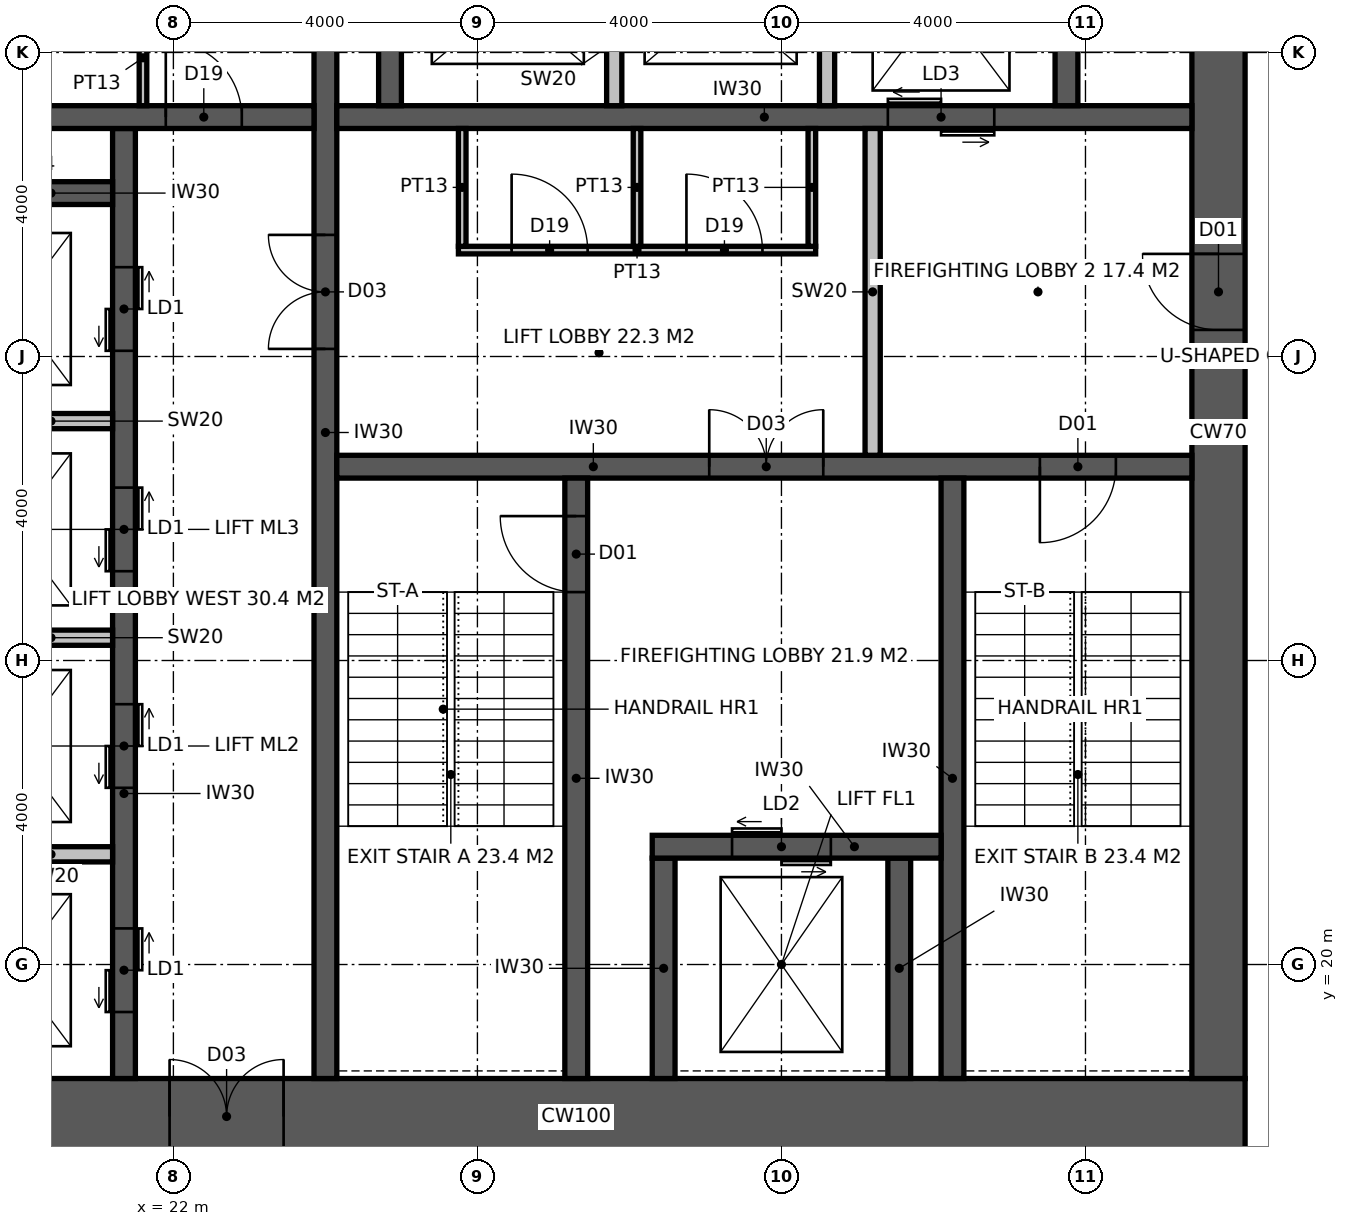
"""IFC4 building model, lengths in metres.
Left out: names, types, materials, properties, quantities, classifications, styles, units other than length and angle.
Written with IfcOpenShell. Run it as: python <this file> out.ifc"""

import sys

from ifc_helpers import new_model, si_unit, direction, frame, frame_2d, origin, place, context, subcontext, project, spatial, rectangle, extrude, element, fill, save


model = new_model("IFC4")
c1 = context("Model", 3, precision=1e-05, world=origin(), true_north=direction((0.0, 1.0)))
c2 = subcontext(c1, "Body", "Model", "MODEL_VIEW")
j1 = project(units=[si_unit("LENGTHUNIT", "METRE"), si_unit("PLANEANGLEUNIT", "RADIAN")], contexts=[c1])
p1 = place(None, origin())
s1 = spatial("IfcSite", under=j1, at=p1, CompositionType="ELEMENT")
p2 = place(p1, origin())
s2 = spatial("IfcBuilding", under=s1, at=p2, CompositionType="ELEMENT")
p3 = place(p2, frame((0.0, 0.0, 109.4)))
s3 = spatial("IfcBuildingStorey", under=s2, at=p3, CompositionType="ELEMENT", Elevation=109.4)
p4 = place(p3, frame((18.5, 18.0, -0.15), z_axis=(0.0, 0.0, 1.0), x_axis=(1.0, 0.0, 0.0)))
e1 = element("IfcWall", 1, at=p4, inside=s3, PredefinedType="SHEAR", context=c2, shape_type="SweptSolid", body=[
    extrude(rectangle(XDim=17.6, YDim=1.0, at=frame_2d((8.8, 0.0))), origin(), (0.0, 0.0, 1.0), 4.0),
])
p5 = place(p4, frame((3.45, 0.0, 0.15)))
e2 = element("IfcOpeningElement", 2, at=p5, cuts=e1, PredefinedType="OPENING", context=c2, shape_type="SweptSolid", body=[
    extrude(rectangle(XDim=1.5, YDim=2.4, at=frame_2d((0.75, 1.2))), frame((0.0, 0.51, 0.0), z_axis=(0.0, -1.0, 0.0), x_axis=(1.0, 0.0, 0.0)), (0.0, 0.0, 1.0), 1.02),
])
p6 = place(p3, frame((35.75, 18.5, -0.15), z_axis=(0.0, 0.0, 1.0), x_axis=(0.0, 1.0, 0.0)))
e3 = element("IfcWall", 3, at=p6, inside=s3, PredefinedType="SHEAR", context=c2, shape_type="SweptSolid", body=[
    extrude(rectangle(XDim=17.0, YDim=0.7, at=frame_2d((8.5, 0.0))), origin(), (0.0, 0.0, 1.0), 4.0),
])
p7 = place(p6, frame((9.85, 0.0, 0.15)))
e4 = element("IfcOpeningElement", 4, at=p7, cuts=e3, PredefinedType="OPENING", context=c2, shape_type="SweptSolid", body=[
    extrude(rectangle(XDim=1.0, YDim=2.2, at=frame_2d((0.5, 1.1))), frame((0.0, 0.36, 0.0), z_axis=(0.0, -1.0, 0.0), x_axis=(1.0, 0.0, 0.0)), (0.0, 0.0, 1.0), 0.72),
])
p8 = place(p3, frame((24.0, 18.5, -0.15), z_axis=(0.0, 0.0, 1.0), x_axis=(0.0, 1.0, 0.0)))
e5 = element("IfcWall", 5, at=p8, inside=s3, PredefinedType="SHEAR", context=c2, shape_type="SweptSolid", body=[
    extrude(rectangle(XDim=17.0, YDim=0.3, at=frame_2d((8.5, 0.0))), origin(), (0.0, 0.0, 1.0), 4.0),
])
p9 = place(p8, frame((9.6, 0.0, 0.15)))
e6 = element("IfcOpeningElement", 6, at=p9, cuts=e5, PredefinedType="OPENING", context=c2, shape_type="SweptSolid", body=[
    extrude(rectangle(XDim=1.5, YDim=2.4, at=frame_2d((0.75, 1.2))), frame((0.0, 0.16, 0.0), z_axis=(0.0, -1.0, 0.0), x_axis=(1.0, 0.0, 0.0)), (0.0, 0.0, 1.0), 0.32),
])
p10 = place(p3, frame((24.15, 26.55, -0.15), z_axis=(0.0, 0.0, 1.0), x_axis=(1.0, 0.0, 0.0)))
e7 = element("IfcWall", 7, at=p10, inside=s3, PredefinedType="SHEAR", context=c2, shape_type="SweptSolid", body=[
    extrude(rectangle(XDim=11.25, YDim=0.3, at=frame_2d((5.625, 0.0))), origin(), (0.0, 0.0, 1.0), 4.0),
])
p11 = place(p10, frame((9.25, 0.0, 0.15)))
e8 = element("IfcOpeningElement", 8, at=p11, cuts=e7, PredefinedType="OPENING", context=c2, shape_type="SweptSolid", body=[
    extrude(rectangle(XDim=1.0, YDim=2.2, at=frame_2d((0.5, 1.1))), frame((0.0, 0.16, 0.0), z_axis=(0.0, -1.0, 0.0), x_axis=(1.0, 0.0, 0.0)), (0.0, 0.0, 1.0), 0.32),
])
p12 = place(p10, frame((4.9, 0.0, 0.15)))
e9 = element("IfcOpeningElement", 9, at=p12, cuts=e7, PredefinedType="OPENING", context=c2, shape_type="SweptSolid", body=[
    extrude(rectangle(XDim=1.5, YDim=2.4, at=frame_2d((0.75, 1.2))), frame((0.0, 0.16, 0.0), z_axis=(0.0, -1.0, 0.0), x_axis=(1.0, 0.0, 0.0)), (0.0, 0.0, 1.0), 0.32),
])
p13 = place(p3, frame((27.3, 18.5, -0.15), z_axis=(0.0, 0.0, 1.0), x_axis=(0.0, 1.0, 0.0)))
e10 = element("IfcWall", 10, at=p13, inside=s3, PredefinedType="SHEAR", context=c2, shape_type="SweptSolid", body=[
    extrude(rectangle(XDim=7.9, YDim=0.3, at=frame_2d((3.95, 0.0))), origin(), (0.0, 0.0, 1.0), 4.0),
])
p14 = place(p13, frame((6.4, 0.0, 0.15)))
e11 = element("IfcOpeningElement", 11, at=p14, cuts=e10, PredefinedType="OPENING", context=c2, shape_type="SweptSolid", body=[
    extrude(rectangle(XDim=1.0, YDim=2.2, at=frame_2d((0.5, 1.1))), frame((0.0, 0.16, 0.0), z_axis=(0.0, -1.0, 0.0), x_axis=(1.0, 0.0, 0.0)), (0.0, 0.0, 1.0), 0.32),
])
p15 = place(p3, frame((32.25, 18.5, -0.15), z_axis=(0.0, 0.0, 1.0), x_axis=(0.0, 1.0, 0.0)))
e12 = element("IfcWall", 12, at=p15, inside=s3, PredefinedType="SHEAR", context=c2, shape_type="SweptSolid", body=[
    extrude(rectangle(XDim=7.9, YDim=0.3, at=frame_2d((3.95, 0.0))), origin(), (0.0, 0.0, 1.0), 4.0),
])
for number, where, z_axis, x_axis in (
    (13, (28.45, 18.5, -0.15), (0.0, 0.0, 1.0), (0.0, 1.0, 0.0)),
    (14, (31.55, 18.5, -0.15), (0.0, 0.0, 1.0), (0.0, 1.0, 0.0)),
):
    element("IfcWall", number, at=place(p3, frame(where, z_axis=z_axis, x_axis=x_axis)), inside=s3, PredefinedType="SHEAR", context=c2, shape_type="SweptSolid", body=[
        extrude(rectangle(XDim=2.9, YDim=0.3, at=frame_2d((1.45, 0.0))), origin(), (0.0, 0.0, 1.0), 4.0),
    ])
p16 = place(p3, frame((28.3, 21.55, -0.15), z_axis=(0.0, 0.0, 1.0), x_axis=(1.0, 0.0, 0.0)))
e15 = element("IfcWall", 15, at=p16, inside=s3, PredefinedType="SHEAR", context=c2, shape_type="SweptSolid", body=[
    extrude(rectangle(XDim=3.8, YDim=0.3, at=frame_2d((1.9, 0.0))), origin(), (0.0, 0.0, 1.0), 4.0),
])
p17 = place(p16, frame((1.05, 0.0, 0.15)))
e16 = element("IfcOpeningElement", 16, at=p17, cuts=e15, PredefinedType="OPENING", context=c2, shape_type="SweptSolid", body=[
    extrude(rectangle(XDim=1.3, YDim=2.4, at=frame_2d((0.65, 1.2))), frame((0.0, 0.16, 0.0), z_axis=(0.0, -1.0, 0.0), x_axis=(1.0, 0.0, 0.0)), (0.0, 0.0, 1.0), 0.32),
])
p18 = place(p3, frame((24.15, 31.15, -0.15), z_axis=(0.0, 0.0, 1.0), x_axis=(1.0, 0.0, 0.0)))
e17 = element("IfcWall", 17, at=p18, inside=s3, PredefinedType="SHEAR", context=c2, shape_type="SweptSolid", body=[
    extrude(rectangle(XDim=11.25, YDim=0.3, at=frame_2d((5.625, 0.0))), origin(), (0.0, 0.0, 1.0), 4.0),
])
p19 = place(p18, frame((7.25, 0.0, 0.15)))
e18 = element("IfcOpeningElement", 18, at=p19, cuts=e17, PredefinedType="OPENING", context=c2, shape_type="SweptSolid", body=[
    extrude(rectangle(XDim=1.4, YDim=2.4, at=frame_2d((0.7, 1.2))), frame((0.0, 0.16, 0.0), z_axis=(0.0, -1.0, 0.0), x_axis=(1.0, 0.0, 0.0)), (0.0, 0.0, 1.0), 0.32),
])
p20 = place(p3, frame((21.35, 18.5, -0.15), z_axis=(0.0, 0.0, 1.0), x_axis=(0.0, 1.0, 0.0)))
e19 = element("IfcWall", 19, at=p20, inside=s3, PredefinedType="SHEAR", context=c2, shape_type="SweptSolid", body=[
    extrude(rectangle(XDim=12.5, YDim=0.3, at=frame_2d((6.25, 0.0))), origin(), (0.0, 0.0, 1.0), 4.0),
])
p21 = place(p20, frame((0.875, 0.0, 0.15)))
e20 = element("IfcOpeningElement", 20, at=p21, cuts=e19, PredefinedType="OPENING", context=c2, shape_type="SweptSolid", body=[
    extrude(rectangle(XDim=1.1, YDim=2.2, at=frame_2d((0.55, 1.1))), frame((0.0, 0.16, 0.0), z_axis=(0.0, -1.0, 0.0), x_axis=(1.0, 0.0, 0.0)), (0.0, 0.0, 1.0), 0.32),
])
p22 = place(p20, frame((3.825, 0.0, 0.15)))
e21 = element("IfcOpeningElement", 21, at=p22, cuts=e19, PredefinedType="OPENING", context=c2, shape_type="SweptSolid", body=[
    extrude(rectangle(XDim=1.1, YDim=2.2, at=frame_2d((0.55, 1.1))), frame((0.0, 0.16, 0.0), z_axis=(0.0, -1.0, 0.0), x_axis=(1.0, 0.0, 0.0)), (0.0, 0.0, 1.0), 0.32),
])
p23 = place(p20, frame((6.675, 0.0, 0.15)))
e22 = element("IfcOpeningElement", 22, at=p23, cuts=e19, PredefinedType="OPENING", context=c2, shape_type="SweptSolid", body=[
    extrude(rectangle(XDim=1.1, YDim=2.2, at=frame_2d((0.55, 1.1))), frame((0.0, 0.16, 0.0), z_axis=(0.0, -1.0, 0.0), x_axis=(1.0, 0.0, 0.0)), (0.0, 0.0, 1.0), 0.32),
])
p24 = place(p20, frame((9.575, 0.0, 0.15)))
e23 = element("IfcOpeningElement", 23, at=p24, cuts=e19, PredefinedType="OPENING", context=c2, shape_type="SweptSolid", body=[
    extrude(rectangle(XDim=1.1, YDim=2.2, at=frame_2d((0.55, 1.1))), frame((0.0, 0.16, 0.0), z_axis=(0.0, -1.0, 0.0), x_axis=(1.0, 0.0, 0.0)), (0.0, 0.0, 1.0), 0.32),
])
p25 = place(p3, frame((18.5, 31.15, -0.15), z_axis=(0.0, 0.0, 1.0), x_axis=(1.0, 0.0, 0.0)))
e24 = element("IfcWall", 24, at=p25, inside=s3, PredefinedType="SHEAR", context=c2, shape_type="SweptSolid", body=[
    extrude(rectangle(XDim=5.35, YDim=0.3, at=frame_2d((2.675, 0.0))), origin(), (0.0, 0.0, 1.0), 4.0),
])
p26 = place(p25, frame((3.4, 0.0, 0.15)))
e25 = element("IfcOpeningElement", 25, at=p26, cuts=e24, PredefinedType="OPENING", context=c2, shape_type="SweptSolid", body=[
    extrude(rectangle(XDim=1.0, YDim=2.2, at=frame_2d((0.5, 1.1))), frame((0.0, 0.16, 0.0), z_axis=(0.0, -1.0, 0.0), x_axis=(1.0, 0.0, 0.0)), (0.0, 0.0, 1.0), 0.32),
])
p27 = place(p3, frame((18.5, 30.15, -0.15), z_axis=(0.0, 0.0, 1.0), x_axis=(1.0, 0.0, 0.0)))
e26 = element("IfcWall", 26, at=p27, inside=s3, PredefinedType="SHEAR", context=c2, shape_type="SweptSolid", body=[
    extrude(rectangle(XDim=2.7, YDim=0.3, at=frame_2d((1.35, 0.0))), origin(), (0.0, 0.0, 1.0), 4.0),
])
for number, where, z_axis, x_axis in (
    (27, (24.85, 31.3, -0.15), (0.0, 0.0, 1.0), (0.0, 1.0, 0.0)),
    (28, (33.75, 31.3, -0.15), (0.0, 0.0, 1.0), (0.0, 1.0, 0.0)),
):
    element("IfcWall", number, at=place(p3, frame(where, z_axis=z_axis, x_axis=x_axis)), inside=s3, PredefinedType="SHEAR", context=c2, shape_type="SweptSolid", body=[
        extrude(rectangle(XDim=4.2, YDim=0.3, at=frame_2d((2.1, 0.0))), origin(), (0.0, 0.0, 1.0), 4.0),
    ])
for number, where, z_axis, x_axis in (
    (29, (27.8, 31.3, -0.15), (0.0, 0.0, 1.0), (0.0, 1.0, 0.0)),
    (30, (30.6, 31.3, -0.15), (0.0, 0.0, 1.0), (0.0, 1.0, 0.0)),
):
    element("IfcWall", number, at=place(p3, frame(where, z_axis=z_axis, x_axis=x_axis)), inside=s3, PredefinedType="SOLIDWALL", context=c2, shape_type="SweptSolid", body=[
        extrude(rectangle(XDim=2.8, YDim=0.2, at=frame_2d((1.4, 0.0))), origin(), (0.0, 0.0, 1.0), 4.0),
    ])
for number, where, z_axis, x_axis in (
    (31, (18.5, 21.45, -0.15), (0.0, 0.0, 1.0), (1.0, 0.0, 0.0)),
    (32, (18.5, 24.3, -0.15), (0.0, 0.0, 1.0), (1.0, 0.0, 0.0)),
    (33, (18.5, 27.15, -0.15), (0.0, 0.0, 1.0), (1.0, 0.0, 0.0)),
):
    element("IfcWall", number, at=place(p3, frame(where, z_axis=z_axis, x_axis=x_axis)), inside=s3, PredefinedType="SOLIDWALL", context=c2, shape_type="SweptSolid", body=[
        extrude(rectangle(XDim=2.7, YDim=0.2, at=frame_2d((1.35, 0.0))), origin(), (0.0, 0.0, 1.0), 4.0),
    ])
p28 = place(p3, frame((31.2, 26.7, 0.0), z_axis=(0.0, 0.0, 1.0), x_axis=(0.0, 1.0, 0.0)))
e34 = element("IfcWall", 34, at=p28, inside=s3, PredefinedType="SOLIDWALL", context=c2, shape_type="SweptSolid", body=[
    extrude(rectangle(XDim=4.3, YDim=0.2, at=frame_2d((2.15, 0.0))), origin(), (0.0, 0.0, 1.0), 3.85),
])
p29 = place(p3, frame((21.6, 31.3, 0.0), z_axis=(0.0, 0.0, 1.0), x_axis=(0.0, 1.0, 0.0)))
e35 = element("IfcWall", 35, at=p29, inside=s3, PredefinedType="PARTITIONING", context=c2, shape_type="SweptSolid", body=[
    extrude(rectangle(XDim=4.2, YDim=0.1, at=frame_2d((2.1, 0.0))), origin(), (0.0, 0.0, 1.0), 3.85),
])
p30 = place(p29, frame((1.55, 0.0, 0.0)))
e36 = element("IfcOpeningElement", 36, at=p30, cuts=e35, PredefinedType="OPENING", context=c2, shape_type="SweptSolid", body=[
    extrude(rectangle(XDim=1.0, YDim=2.2, at=frame_2d((0.5, 1.1))), frame((0.0, 0.06, 0.0), z_axis=(0.0, -1.0, 0.0), x_axis=(1.0, 0.0, 0.0)), (0.0, 0.0, 1.0), 0.12),
])
p31 = place(p3, frame((25.75, 29.4, 0.0), z_axis=(0.0, 0.0, 1.0), x_axis=(1.0, 0.0, 0.0)))
e37 = element("IfcWall", 37, at=p31, inside=s3, PredefinedType="PARTITIONING", context=c2, shape_type="SweptSolid", body=[
    extrude(rectangle(XDim=4.7, YDim=0.1, at=frame_2d((2.35, 0.0))), origin(), (0.0, 0.0, 1.0), 3.85),
])
p32 = place(p31, frame((0.7, 0.0, 0.0)))
e38 = element("IfcOpeningElement", 38, at=p32, cuts=e37, PredefinedType="OPENING", context=c2, shape_type="SweptSolid", body=[
    extrude(rectangle(XDim=1.0, YDim=2.2, at=frame_2d((0.5, 1.1))), frame((0.0, 0.06, 0.0), z_axis=(0.0, -1.0, 0.0), x_axis=(1.0, 0.0, 0.0)), (0.0, 0.0, 1.0), 0.12),
])
p33 = place(p31, frame((3.0, 0.0, 0.0)))
e39 = element("IfcOpeningElement", 39, at=p33, cuts=e37, PredefinedType="OPENING", context=c2, shape_type="SweptSolid", body=[
    extrude(rectangle(XDim=1.0, YDim=2.2, at=frame_2d((0.5, 1.1))), frame((0.0, 0.06, 0.0), z_axis=(0.0, -1.0, 0.0), x_axis=(1.0, 0.0, 0.0)), (0.0, 0.0, 1.0), 0.12),
])
for number, where, z_axis, x_axis in (
    (40, (25.8, 29.45, 0.0), (0.0, 0.0, 1.0), (0.0, 1.0, 0.0)),
    (41, (30.4, 29.45, 0.0), (0.0, 0.0, 1.0), (0.0, 1.0, 0.0)),
    (42, (28.1, 29.45, 0.0), (0.0, 0.0, 1.0), (0.0, 1.0, 0.0)),
):
    element("IfcWall", number, at=place(p3, frame(where, z_axis=z_axis, x_axis=x_axis)), inside=s3, PredefinedType="PARTITIONING", context=c2, shape_type="SweptSolid", body=[
        extrude(rectangle(XDim=1.55, YDim=0.1, at=frame_2d((0.775, 0.0))), origin(), (0.0, 0.0, 1.0), 3.85),
    ])
p34 = place(p14, origin())
e43 = element("IfcDoor", 43, at=p34, inside=s3, OperationType="SINGLE_SWING_RIGHT", PredefinedType="DOOR", context=c2, shape_type="SweptSolid", body=[
    extrude(rectangle(XDim=1.0, YDim=2.2, at=frame_2d((0.5, 1.1))), frame((0.0, 0.025, 0.0), z_axis=(0.0, -1.0, 0.0), x_axis=(1.0, 0.0, 0.0)), (0.0, 0.0, 1.0), 0.05),
])
fill(e11, e43)
p35 = place(p11, frame((1.0, 0.0, 0.0), z_axis=(0.0, 0.0, 1.0), x_axis=(-1.0, 0.0, 0.0)))
e44 = element("IfcDoor", 44, at=p35, inside=s3, OperationType="SINGLE_SWING_RIGHT", PredefinedType="DOOR", context=c2, shape_type="SweptSolid", body=[
    extrude(rectangle(XDim=1.0, YDim=2.2, at=frame_2d((0.5, 1.1))), frame((0.0, 0.025, 0.0), z_axis=(0.0, -1.0, 0.0), x_axis=(1.0, 0.0, 0.0)), (0.0, 0.0, 1.0), 0.05),
])
fill(e8, e44)
p36 = place(p7, origin())
e45 = element("IfcDoor", 45, at=p36, inside=s3, OperationType="SINGLE_SWING_RIGHT", PredefinedType="DOOR", context=c2, shape_type="SweptSolid", body=[
    extrude(rectangle(XDim=1.0, YDim=2.2, at=frame_2d((0.5, 1.1))), frame((0.0, 0.025, 0.0), z_axis=(0.0, -1.0, 0.0), x_axis=(1.0, 0.0, 0.0)), (0.0, 0.0, 1.0), 0.05),
])
fill(e4, e45)
p37 = place(p12, origin())
e46 = element("IfcDoor", 46, at=p37, inside=s3, OperationType="DOUBLE_DOOR_DOUBLE_SWING", PredefinedType="DOOR", context=c2, shape_type="SweptSolid", body=[
    extrude(rectangle(XDim=1.5, YDim=2.4, at=frame_2d((0.75, 1.2))), frame((0.0, 0.025, 0.0), z_axis=(0.0, -1.0, 0.0), x_axis=(1.0, 0.0, 0.0)), (0.0, 0.0, 1.0), 0.05),
])
fill(e9, e46)
p38 = place(p9, origin())
e47 = element("IfcDoor", 47, at=p38, inside=s3, OperationType="DOUBLE_DOOR_DOUBLE_SWING", PredefinedType="DOOR", context=c2, shape_type="SweptSolid", body=[
    extrude(rectangle(XDim=1.5, YDim=2.4, at=frame_2d((0.75, 1.2))), frame((0.0, 0.025, 0.0), z_axis=(0.0, -1.0, 0.0), x_axis=(1.0, 0.0, 0.0)), (0.0, 0.0, 1.0), 0.05),
])
fill(e6, e47)
p39 = place(p26, origin())
e48 = element("IfcDoor", 48, at=p39, inside=s3, OperationType="SINGLE_SWING_LEFT", PredefinedType="DOOR", context=c2, shape_type="SweptSolid", body=[
    extrude(rectangle(XDim=1.0, YDim=2.2, at=frame_2d((0.5, 1.1))), frame((0.0, 0.025, 0.0), z_axis=(0.0, -1.0, 0.0), x_axis=(1.0, 0.0, 0.0)), (0.0, 0.0, 1.0), 0.05),
])
fill(e25, e48)
p40 = place(p32, origin())
e49 = element("IfcDoor", 49, at=p40, inside=s3, OperationType="SINGLE_SWING_LEFT", PredefinedType="DOOR", context=c2, shape_type="SweptSolid", body=[
    extrude(rectangle(XDim=1.0, YDim=2.2, at=frame_2d((0.5, 1.1))), frame((0.0, 0.025, 0.0), z_axis=(0.0, -1.0, 0.0), x_axis=(1.0, 0.0, 0.0)), (0.0, 0.0, 1.0), 0.05),
])
fill(e38, e49)
p41 = place(p33, origin())
e50 = element("IfcDoor", 50, at=p41, inside=s3, OperationType="SINGLE_SWING_LEFT", PredefinedType="DOOR", context=c2, shape_type="SweptSolid", body=[
    extrude(rectangle(XDim=1.0, YDim=2.2, at=frame_2d((0.5, 1.1))), frame((0.0, 0.025, 0.0), z_axis=(0.0, -1.0, 0.0), x_axis=(1.0, 0.0, 0.0)), (0.0, 0.0, 1.0), 0.05),
])
fill(e39, e50)
p42 = place(p5, origin())
e51 = element("IfcDoor", 51, at=p42, inside=s3, OperationType="DOUBLE_DOOR_DOUBLE_SWING", PredefinedType="DOOR", context=c2, shape_type="SweptSolid", body=[
    extrude(rectangle(XDim=1.5, YDim=2.4, at=frame_2d((0.75, 1.2))), frame((0.0, 0.025, 0.0), z_axis=(0.0, -1.0, 0.0), x_axis=(1.0, 0.0, 0.0)), (0.0, 0.0, 1.0), 0.05),
])
fill(e2, e51)
p43 = place(p17, origin())
e52 = element("IfcDoor", 52, at=p43, inside=s3, OperationType="DOUBLE_DOOR_SLIDING", PredefinedType="DOOR", context=c2, shape_type="SweptSolid", body=[
    extrude(rectangle(XDim=1.3, YDim=2.4, at=frame_2d((0.65, 1.2))), frame((0.0, 0.025, 0.0), z_axis=(0.0, -1.0, 0.0), x_axis=(1.0, 0.0, 0.0)), (0.0, 0.0, 1.0), 0.05),
])
fill(e16, e52)
p44 = place(p19, origin())
e53 = element("IfcDoor", 53, at=p44, inside=s3, OperationType="DOUBLE_DOOR_SLIDING", PredefinedType="DOOR", context=c2, shape_type="SweptSolid", body=[
    extrude(rectangle(XDim=1.4, YDim=2.4, at=frame_2d((0.7, 1.2))), frame((0.0, 0.025, 0.0), z_axis=(0.0, -1.0, 0.0), x_axis=(1.0, 0.0, 0.0)), (0.0, 0.0, 1.0), 0.05),
])
fill(e18, e53)
p45 = place(p21, origin())
e54 = element("IfcDoor", 54, at=p45, inside=s3, OperationType="DOUBLE_DOOR_SLIDING", PredefinedType="DOOR", context=c2, shape_type="SweptSolid", body=[
    extrude(rectangle(XDim=1.1, YDim=2.2, at=frame_2d((0.55, 1.1))), frame((0.0, 0.025, 0.0), z_axis=(0.0, -1.0, 0.0), x_axis=(1.0, 0.0, 0.0)), (0.0, 0.0, 1.0), 0.05),
])
fill(e20, e54)
p46 = place(p22, origin())
e55 = element("IfcDoor", 55, at=p46, inside=s3, OperationType="DOUBLE_DOOR_SLIDING", PredefinedType="DOOR", context=c2, shape_type="SweptSolid", body=[
    extrude(rectangle(XDim=1.1, YDim=2.2, at=frame_2d((0.55, 1.1))), frame((0.0, 0.025, 0.0), z_axis=(0.0, -1.0, 0.0), x_axis=(1.0, 0.0, 0.0)), (0.0, 0.0, 1.0), 0.05),
])
fill(e21, e55)
p47 = place(p23, origin())
e56 = element("IfcDoor", 56, at=p47, inside=s3, OperationType="DOUBLE_DOOR_SLIDING", PredefinedType="DOOR", context=c2, shape_type="SweptSolid", body=[
    extrude(rectangle(XDim=1.1, YDim=2.2, at=frame_2d((0.55, 1.1))), frame((0.0, 0.025, 0.0), z_axis=(0.0, -1.0, 0.0), x_axis=(1.0, 0.0, 0.0)), (0.0, 0.0, 1.0), 0.05),
])
fill(e22, e56)
p48 = place(p24, origin())
e57 = element("IfcDoor", 57, at=p48, inside=s3, OperationType="DOUBLE_DOOR_SLIDING", PredefinedType="DOOR", context=c2, shape_type="SweptSolid", body=[
    extrude(rectangle(XDim=1.1, YDim=2.2, at=frame_2d((0.55, 1.1))), frame((0.0, 0.025, 0.0), z_axis=(0.0, -1.0, 0.0), x_axis=(1.0, 0.0, 0.0)), (0.0, 0.0, 1.0), 0.05),
])
fill(e23, e57)
save(model, sys.argv[1])
